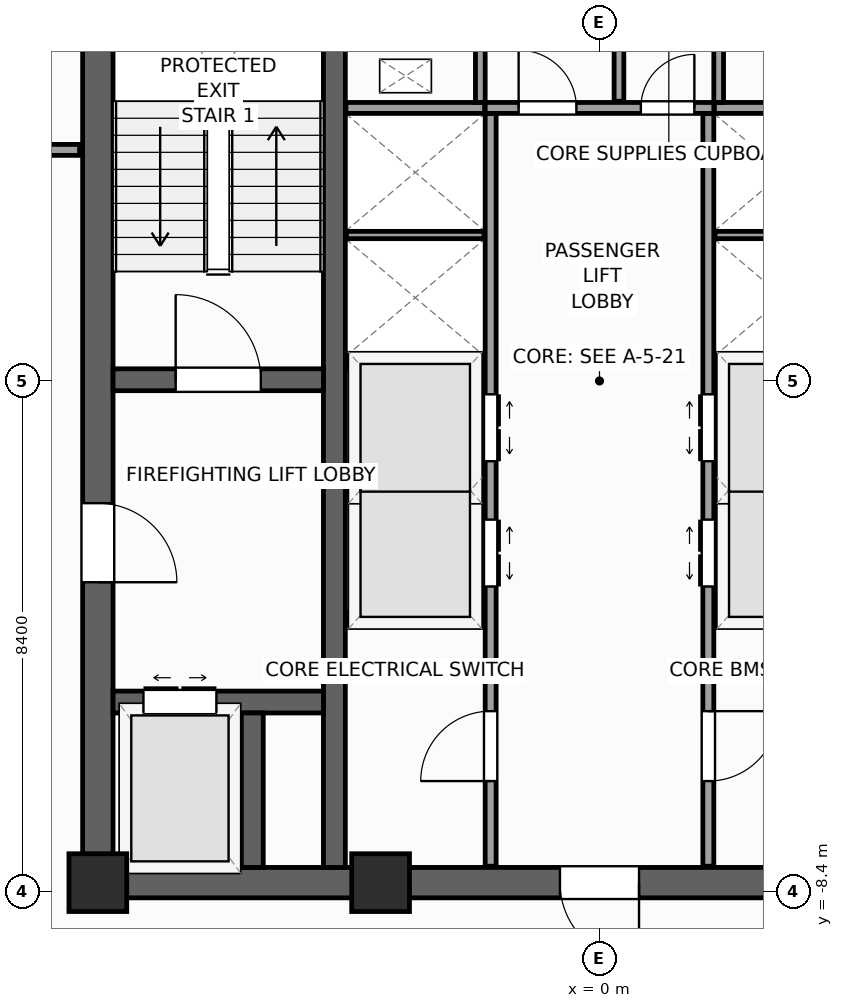
"""IFC4 building model, lengths in metres.
Left out: names, types, materials, properties, quantities, classifications, styles, units other than length and angle.
Written with IfcOpenShell. Run it as: python <this file> out.ifc"""

import sys

from ifc_helpers import new_model, si_unit, direction, frame, frame_2d, origin, origin_2d, place, context, subcontext, project, spatial, rectangle, extrude, source, transform, mapped, element, fill, save


model = new_model("IFC4")
c1 = context("Model", 3, precision=1e-05, world=origin(), true_north=direction((0.0, 1.0)))
c2 = subcontext(c1, "Body", "Model", "MODEL_VIEW")
j1 = project(units=[si_unit("LENGTHUNIT", "METRE"), si_unit("PLANEANGLEUNIT", "RADIAN")], contexts=[c1])
p1 = place(None, origin())
s1 = spatial("IfcSite", under=j1, at=p1, CompositionType="ELEMENT")
p2 = place(p1, origin())
s2 = spatial("IfcBuilding", under=s1, at=p2, CompositionType="ELEMENT")
p3 = place(p2, frame((0.0, 0.0, 225.1)))
s3 = spatial("IfcBuildingStorey", under=s2, at=p3, CompositionType="ELEMENT", Elevation=225.1)
p4 = place(p3, frame((-8.5, -8.25, 0.0), z_axis=(0.0, 0.0, 1.0), x_axis=(1.0, 0.0, 0.0)))
e1 = element("IfcWall", 1, at=p4, inside=s3, PredefinedType="SHEAR", context=c2, shape_type="SweptSolid", body=[
    extrude(rectangle(XDim=17.0, YDim=0.5, at=frame_2d((8.5, 0.0))), origin(), (0.0, 0.0, 1.0), 3.9),
])
p5 = place(p4, frame((7.85, 0.0, 0.0)))
e2 = element("IfcOpeningElement", 2, at=p5, cuts=e1, PredefinedType="OPENING", context=c2, shape_type="SweptSolid", body=[
    extrude(rectangle(XDim=1.3, YDim=2.2, at=frame_2d((0.65, 1.1))), frame((0.0, 0.26, 0.0), z_axis=(0.0, -1.0, 0.0), x_axis=(1.0, 0.0, 0.0)), (0.0, 0.0, 1.0), 0.52),
])
p6 = place(p3, frame((-8.25, -8.0, 0.0), z_axis=(0.0, 0.0, 1.0), x_axis=(0.0, 1.0, 0.0)))
e3 = element("IfcWall", 3, at=p6, inside=s3, PredefinedType="SHEAR", context=c2, shape_type="SweptSolid", body=[
    extrude(rectangle(XDim=16.0, YDim=0.5, at=frame_2d((8.0, 0.0))), origin(), (0.0, 0.0, 1.0), 3.9),
])
p7 = place(p6, frame((4.69, 0.0, 0.0)))
e4 = element("IfcOpeningElement", 4, at=p7, cuts=e3, PredefinedType="OPENING", context=c2, shape_type="SweptSolid", body=[
    extrude(rectangle(XDim=1.3, YDim=2.2, at=frame_2d((0.65, 1.1))), frame((0.0, 0.26, 0.0), z_axis=(0.0, -1.0, 0.0), x_axis=(1.0, 0.0, 0.0)), (0.0, 0.0, 1.0), 0.52),
])
p8 = place(p3, frame((-4.36, -8.0, 0.0), z_axis=(0.0, 0.0, 1.0), x_axis=(0.0, 1.0, 0.0)))
e5 = element("IfcWall", 5, at=p8, inside=s3, PredefinedType="SHEAR", context=c2, shape_type="SweptSolid", body=[
    extrude(rectangle(XDim=16.0, YDim=0.36, at=frame_2d((8.0, 0.0))), origin(), (0.0, 0.0, 1.0), 3.9),
])
p9 = place(p3, frame((-8.0, 0.02, 0.0), z_axis=(0.0, 0.0, 1.0), x_axis=(1.0, 0.0, 0.0)))
e6 = element("IfcWall", 6, at=p9, inside=s3, PredefinedType="SHEAR", context=c2, shape_type="SweptSolid", body=[
    extrude(rectangle(XDim=3.46, YDim=0.36, at=frame_2d((1.73, 0.0))), origin(), (0.0, 0.0, 1.0), 3.9),
])
p10 = place(p9, frame((1.03, 0.0, 0.0)))
e7 = element("IfcOpeningElement", 7, at=p10, cuts=e6, PredefinedType="OPENING", context=c2, shape_type="SweptSolid", body=[
    extrude(rectangle(XDim=1.4, YDim=2.2, at=frame_2d((0.7, 1.1))), frame((0.0, 0.19, 0.0), z_axis=(0.0, -1.0, 0.0), x_axis=(1.0, 0.0, 0.0)), (0.0, 0.0, 1.0), 0.38),
])
p11 = place(p3, frame((-8.0, -5.28, 0.0), z_axis=(0.0, 0.0, 1.0), x_axis=(1.0, 0.0, 0.0)))
e8 = element("IfcWall", 8, at=p11, inside=s3, PredefinedType="SHEAR", context=c2, shape_type="SweptSolid", body=[
    extrude(rectangle(XDim=3.46, YDim=0.36, at=frame_2d((1.73, 0.0))), origin(), (0.0, 0.0, 1.0), 3.9),
])
p12 = place(p11, frame((0.5, 0.0, 0.0)))
e9 = element("IfcOpeningElement", 9, at=p12, cuts=e8, PredefinedType="OPENING", context=c2, shape_type="SweptSolid", body=[
    extrude(rectangle(XDim=1.2, YDim=2.25, at=frame_2d((0.6, 1.125))), frame((0.0, 0.19, 0.0), z_axis=(0.0, -1.0, 0.0), x_axis=(1.0, 0.0, 0.0)), (0.0, 0.0, 1.0), 0.38),
])
p13 = place(p3, frame((-5.71, -8.0, 0.0), z_axis=(0.0, 0.0, 1.0), x_axis=(0.0, 1.0, 0.0)))
e10 = element("IfcWall", 10, at=p13, inside=s3, PredefinedType="SHEAR", context=c2, shape_type="SweptSolid", body=[
    extrude(rectangle(XDim=2.54, YDim=0.36, at=frame_2d((1.27, 0.0))), origin(), (0.0, 0.0, 1.0), 3.9),
])
m1 = source(origin(), c2, "Body", "SweptSolid", [
    extrude(rectangle(XDim=0.95, YDim=0.95, at=origin_2d()), origin(), (0.0, 0.0, 1.0), 3.9),
])
for number, where, z_axis, x_axis in (
    (11, (-8.25, -8.25, 0.0), (0.0, 0.0, 1.0), (1.0, 0.0, 0.0)),
    (12, (-3.6, -8.25, 0.0), (0.0, 0.0, 1.0), (1.0, 0.0, 0.0)),
):
    element("IfcColumn", number, at=place(p3, frame(where, z_axis=z_axis, x_axis=x_axis)), inside=s3, PredefinedType="PILASTER", context=c2, shape_type="MappedRepresentation", body=[
        mapped(m1, transform((0.0, 0.0, 0.0), scale=1.0)),
    ])
p14 = place(p3, frame((-6.733, 29.154, 0.0), z_axis=(0.0, 0.0, 1.0), x_axis=(-0.629325378072, -0.77714192302, 0.0)))
e13 = element("IfcWall", 13, at=p14, inside=s3, PredefinedType="STANDARD", context=c2, shape_type="SweptSolid", body=[
    extrude(rectangle(XDim=36.84, YDim=0.34, at=frame_2d((18.42, 0.0))), origin(), (0.0, 0.0, 1.0), 2.96),
])
p15 = place(p14, frame((12.295, 0.0, 0.0)))
e14 = element("IfcOpeningElement", 14, at=p15, cuts=e13, PredefinedType="OPENING", context=c2, shape_type="SweptSolid", body=[
    extrude(rectangle(XDim=1.05, YDim=2.25, at=frame_2d((0.525, 1.125))), frame((0.0, 0.18, 0.0), z_axis=(0.0, -1.0, 0.0), x_axis=(1.0, 0.0, 0.0)), (0.0, 0.0, 1.0), 0.36),
])
p16 = place(p14, frame((3.721, 0.0, 0.48)))
e15 = element("IfcOpeningElement", 15, at=p16, cuts=e13, PredefinedType="OPENING", context=c2, shape_type="SweptSolid", body=[
    extrude(rectangle(XDim=1.4, YDim=2.4, at=frame_2d((0.7, 1.2))), frame((0.0, 0.18, 0.0), z_axis=(0.0, -1.0, 0.0), x_axis=(1.0, 0.0, 0.0)), (0.0, 0.0, 1.0), 0.36),
])
p17 = place(p14, frame((9.059, 0.0, 0.58)))
e16 = element("IfcOpeningElement", 16, at=p17, cuts=e13, PredefinedType="OPENING", context=c2, shape_type="SweptSolid", body=[
    extrude(rectangle(XDim=1.75, YDim=2.3, at=frame_2d((0.875, 1.15))), frame((0.0, 0.18, 0.0), z_axis=(0.0, -1.0, 0.0), x_axis=(1.0, 0.0, 0.0)), (0.0, 0.0, 1.0), 0.36),
])
p18 = place(p14, frame((16.058, 0.0, 0.58)))
e17 = element("IfcOpeningElement", 17, at=p18, cuts=e13, PredefinedType="OPENING", context=c2, shape_type="SweptSolid", body=[
    extrude(rectangle(XDim=1.75, YDim=2.3, at=frame_2d((0.875, 1.15))), frame((0.0, 0.18, 0.0), z_axis=(0.0, -1.0, 0.0), x_axis=(1.0, 0.0, 0.0)), (0.0, 0.0, 1.0), 0.36),
])
p19 = place(p14, frame((24.176, 0.0, 0.58)))
e18 = element("IfcOpeningElement", 18, at=p19, cuts=e13, PredefinedType="OPENING", context=c2, shape_type="SweptSolid", body=[
    extrude(rectangle(XDim=1.75, YDim=2.3, at=frame_2d((0.875, 1.15))), frame((0.0, 0.18, 0.0), z_axis=(0.0, -1.0, 0.0), x_axis=(1.0, 0.0, 0.0)), (0.0, 0.0, 1.0), 0.36),
])
p20 = place(p14, frame((30.232, 0.0, 0.48)))
e19 = element("IfcOpeningElement", 19, at=p20, cuts=e13, PredefinedType="OPENING", context=c2, shape_type="SweptSolid", body=[
    extrude(rectangle(XDim=1.4, YDim=2.4, at=frame_2d((0.7, 1.2))), frame((0.0, 0.18, 0.0), z_axis=(0.0, -1.0, 0.0), x_axis=(1.0, 0.0, 0.0)), (0.0, 0.0, 1.0), 0.36),
])
p21 = place(p3, frame((-29.154, -6.733, 0.0), z_axis=(0.0, 0.0, 1.0), x_axis=(0.77714192302, -0.629325378072, 0.0)))
e20 = element("IfcWall", 20, at=p21, inside=s3, PredefinedType="STANDARD", context=c2, shape_type="SweptSolid", body=[
    extrude(rectangle(XDim=36.84, YDim=0.34, at=frame_2d((18.42, 0.0))), origin(), (0.0, 0.0, 1.0), 2.96),
])
p22 = place(p21, frame((3.721, 0.0, 0.48)))
e21 = element("IfcOpeningElement", 21, at=p22, cuts=e20, PredefinedType="OPENING", context=c2, shape_type="SweptSolid", body=[
    extrude(rectangle(XDim=1.4, YDim=2.4, at=frame_2d((0.7, 1.2))), frame((0.0, 0.18, 0.0), z_axis=(0.0, -1.0, 0.0), x_axis=(1.0, 0.0, 0.0)), (0.0, 0.0, 1.0), 0.36),
])
p23 = place(p21, frame((9.809, 0.0, 0.58)))
e22 = element("IfcOpeningElement", 22, at=p23, cuts=e20, PredefinedType="OPENING", context=c2, shape_type="SweptSolid", body=[
    extrude(rectangle(XDim=1.75, YDim=2.3, at=frame_2d((0.875, 1.15))), frame((0.0, 0.18, 0.0), z_axis=(0.0, -1.0, 0.0), x_axis=(1.0, 0.0, 0.0)), (0.0, 0.0, 1.0), 0.36),
])
p24 = place(p21, frame((16.058, 0.0, 0.58)))
e23 = element("IfcOpeningElement", 23, at=p24, cuts=e20, PredefinedType="OPENING", context=c2, shape_type="SweptSolid", body=[
    extrude(rectangle(XDim=1.75, YDim=2.3, at=frame_2d((0.875, 1.15))), frame((0.0, 0.18, 0.0), z_axis=(0.0, -1.0, 0.0), x_axis=(1.0, 0.0, 0.0)), (0.0, 0.0, 1.0), 0.36),
])
p25 = place(p21, frame((24.176, 0.0, 0.58)))
e24 = element("IfcOpeningElement", 24, at=p25, cuts=e20, PredefinedType="OPENING", context=c2, shape_type="SweptSolid", body=[
    extrude(rectangle(XDim=1.75, YDim=2.3, at=frame_2d((0.875, 1.15))), frame((0.0, 0.18, 0.0), z_axis=(0.0, -1.0, 0.0), x_axis=(1.0, 0.0, 0.0)), (0.0, 0.0, 1.0), 0.36),
])
p26 = place(p21, frame((30.982, 0.0, 0.48)))
e25 = element("IfcOpeningElement", 25, at=p26, cuts=e20, PredefinedType="OPENING", context=c2, shape_type="SweptSolid", body=[
    extrude(rectangle(XDim=1.4, YDim=2.4, at=frame_2d((0.7, 1.2))), frame((0.0, 0.18, 0.0), z_axis=(0.0, -1.0, 0.0), x_axis=(1.0, 0.0, 0.0)), (0.0, 0.0, 1.0), 0.36),
])
p27 = place(p3, frame((-1.79, -7.98, 0.0), z_axis=(0.0, 0.0, 1.0), x_axis=(0.0, 1.0, 0.0)))
e26 = element("IfcWall", 26, at=p27, inside=s3, PredefinedType="PARTITIONING", context=c2, shape_type="SweptSolid", body=[
    extrude(rectangle(XDim=12.38, YDim=0.18, at=frame_2d((6.19, 0.0))), origin(), (0.0, 0.0, 1.0), 3.66),
])
p28 = place(p27, frame((4.6, 0.0, 0.0)))
e27 = element("IfcOpeningElement", 27, at=p28, cuts=e26, PredefinedType="OPENING", context=c2, shape_type="SweptSolid", body=[
    extrude(rectangle(XDim=1.1, YDim=2.2, at=frame_2d((0.55, 1.1))), frame((0.0, 0.1, 0.0), z_axis=(0.0, -1.0, 0.0), x_axis=(1.0, 0.0, 0.0)), (0.0, 0.0, 1.0), 0.2),
])
p29 = place(p27, frame((6.66, 0.0, 0.0)))
e28 = element("IfcOpeningElement", 28, at=p29, cuts=e26, PredefinedType="OPENING", context=c2, shape_type="SweptSolid", body=[
    extrude(rectangle(XDim=1.1, YDim=2.2, at=frame_2d((0.55, 1.1))), frame((0.0, 0.1, 0.0), z_axis=(0.0, -1.0, 0.0), x_axis=(1.0, 0.0, 0.0)), (0.0, 0.0, 1.0), 0.2),
])
p30 = place(p27, frame((1.4, 0.0, 0.0)))
e29 = element("IfcOpeningElement", 29, at=p30, cuts=e26, PredefinedType="OPENING", context=c2, shape_type="SweptSolid", body=[
    extrude(rectangle(XDim=1.15, YDim=2.25, at=frame_2d((0.575, 1.125))), frame((0.0, 0.1, 0.0), z_axis=(0.0, -1.0, 0.0), x_axis=(1.0, 0.0, 0.0)), (0.0, 0.0, 1.0), 0.2),
])
p31 = place(p3, frame((1.79, -7.98, 0.0), z_axis=(0.0, 0.0, 1.0), x_axis=(0.0, 1.0, 0.0)))
e30 = element("IfcWall", 30, at=p31, inside=s3, PredefinedType="PARTITIONING", context=c2, shape_type="SweptSolid", body=[
    extrude(rectangle(XDim=12.38, YDim=0.18, at=frame_2d((6.19, 0.0))), origin(), (0.0, 0.0, 1.0), 3.66),
])
p32 = place(p31, frame((4.6, 0.0, 0.0)))
e31 = element("IfcOpeningElement", 31, at=p32, cuts=e30, PredefinedType="OPENING", context=c2, shape_type="SweptSolid", body=[
    extrude(rectangle(XDim=1.1, YDim=2.2, at=frame_2d((0.55, 1.1))), frame((0.0, 0.1, 0.0), z_axis=(0.0, -1.0, 0.0), x_axis=(1.0, 0.0, 0.0)), (0.0, 0.0, 1.0), 0.2),
])
p33 = place(p31, frame((6.66, 0.0, 0.0)))
e32 = element("IfcOpeningElement", 32, at=p33, cuts=e30, PredefinedType="OPENING", context=c2, shape_type="SweptSolid", body=[
    extrude(rectangle(XDim=1.1, YDim=2.2, at=frame_2d((0.55, 1.1))), frame((0.0, 0.1, 0.0), z_axis=(0.0, -1.0, 0.0), x_axis=(1.0, 0.0, 0.0)), (0.0, 0.0, 1.0), 0.2),
])
p34 = place(p31, frame((1.4, 0.0, 0.0)))
e33 = element("IfcOpeningElement", 33, at=p34, cuts=e30, PredefinedType="OPENING", context=c2, shape_type="SweptSolid", body=[
    extrude(rectangle(XDim=1.15, YDim=2.25, at=frame_2d((0.575, 1.125))), frame((0.0, 0.1, 0.0), z_axis=(0.0, -1.0, 0.0), x_axis=(1.0, 0.0, 0.0)), (0.0, 0.0, 1.0), 0.2),
])
p35 = place(p3, frame((-1.88, 4.49, 0.0), z_axis=(0.0, 0.0, 1.0), x_axis=(1.0, 0.0, 0.0)))
e34 = element("IfcWall", 34, at=p35, inside=s3, PredefinedType="PARTITIONING", context=c2, shape_type="SweptSolid", body=[
    extrude(rectangle(XDim=3.76, YDim=0.18, at=frame_2d((1.88, 0.0))), origin(), (0.0, 0.0, 1.0), 3.66),
])
p36 = place(p35, frame((0.55, 0.0, 0.0)))
e35 = element("IfcOpeningElement", 35, at=p36, cuts=e34, PredefinedType="OPENING", context=c2, shape_type="SweptSolid", body=[
    extrude(rectangle(XDim=0.95, YDim=2.1, at=frame_2d((0.475, 1.05))), frame((0.0, 0.1, 0.0), z_axis=(0.0, -1.0, 0.0), x_axis=(1.0, 0.0, 0.0)), (0.0, 0.0, 1.0), 0.2),
])
p37 = place(p35, frame((2.56, 0.0, 0.0)))
e36 = element("IfcOpeningElement", 36, at=p37, cuts=e34, PredefinedType="OPENING", context=c2, shape_type="SweptSolid", body=[
    extrude(rectangle(XDim=0.88, YDim=2.1, at=frame_2d((0.44, 1.05))), frame((0.0, 0.1, 0.0), z_axis=(0.0, -1.0, 0.0), x_axis=(1.0, 0.0, 0.0)), (0.0, 0.0, 1.0), 0.2),
])
for number, where, z_axis, x_axis in (
    (37, (-4.17, -3.9, 0.0), (0.0, 0.0, 1.0), (1.0, 0.0, 0.0)),
    (38, (1.89, -3.9, 0.0), (0.0, 0.0, 1.0), (1.0, 0.0, 0.0)),
    (39, (-4.17, 0.3, 0.0), (0.0, 0.0, 1.0), (1.0, 0.0, 0.0)),
    (40, (1.89, 0.3, 0.0), (0.0, 0.0, 1.0), (1.0, 0.0, 0.0)),
    (41, (-4.17, 4.49, 0.0), (0.0, 0.0, 1.0), (1.0, 0.0, 0.0)),
    (42, (1.89, 4.49, 0.0), (0.0, 0.0, 1.0), (1.0, 0.0, 0.0)),
):
    element("IfcWall", number, at=place(p3, frame(where, z_axis=z_axis, x_axis=x_axis)), inside=s3, PredefinedType="PARTITIONING", context=c2, shape_type="SweptSolid", body=[
        extrude(rectangle(XDim=2.28, YDim=0.18, at=frame_2d((1.14, 0.0))), origin(), (0.0, 0.0, 1.0), 3.66),
    ])
for number, where, z_axis, x_axis in (
    (43, (-4.16, -1.8, 0.0), (0.0, 0.0, 1.0), (1.0, 0.0, 0.0)),
    (44, (1.9, -1.8, 0.0), (0.0, 0.0, 1.0), (1.0, 0.0, 0.0)),
    (45, (-4.16, 2.4, 0.0), (0.0, 0.0, 1.0), (1.0, 0.0, 0.0)),
    (46, (1.9, 2.4, 0.0), (0.0, 0.0, 1.0), (1.0, 0.0, 0.0)),
):
    element("IfcWall", number, at=place(p3, frame(where, z_axis=z_axis, x_axis=x_axis)), inside=s3, PredefinedType="PARTITIONING", context=c2, shape_type="SweptSolid", body=[
        extrude(rectangle(XDim=2.26, YDim=0.12, at=frame_2d((1.13, 0.0))), origin(), (0.0, 0.0, 1.0), 3.66),
    ])
for number, where, z_axis, x_axis in (
    (47, (-1.96, 4.58, 0.0), (0.0, 0.0, 1.0), (0.0, 1.0, 0.0)),
    (48, (1.96, 4.58, 0.0), (0.0, 0.0, 1.0), (0.0, 1.0, 0.0)),
):
    element("IfcWall", number, at=place(p3, frame(where, z_axis=z_axis, x_axis=x_axis)), inside=s3, PredefinedType="PARTITIONING", context=c2, shape_type="SweptSolid", body=[
        extrude(rectangle(XDim=3.4, YDim=0.16, at=frame_2d((1.7, 0.0))), origin(), (0.0, 0.0, 1.0), 3.66),
    ])
p38 = place(p3, frame((0.32, 4.6, 0.0), z_axis=(0.0, 0.0, 1.0), x_axis=(0.0, 1.0, 0.0)))
e49 = element("IfcWall", 49, at=p38, inside=s3, PredefinedType="PARTITIONING", context=c2, shape_type="SweptSolid", body=[
    extrude(rectangle(XDim=1.95, YDim=0.16, at=frame_2d((0.975, 0.0))), origin(), (0.0, 0.0, 1.0), 3.66),
])
p39 = place(p3, frame((-12.45, 3.8, 0.0), z_axis=(0.0, 0.0, 1.0), x_axis=(1.0, 0.0, 0.0)))
e50 = element("IfcWall", 50, at=p39, inside=s3, PredefinedType="PARTITIONING", context=c2, shape_type="SweptSolid", body=[
    extrude(rectangle(XDim=3.9, YDim=0.18, at=frame_2d((1.95, 0.0))), origin(), (0.0, 0.0, 1.0), 3.66),
])
p40 = place(p39, frame((1.4, 0.0, 0.0)))
e51 = element("IfcOpeningElement", 51, at=p40, cuts=e50, PredefinedType="OPENING", context=c2, shape_type="SweptSolid", body=[
    extrude(rectangle(XDim=1.1, YDim=2.2, at=frame_2d((0.55, 1.1))), frame((0.0, 0.1, 0.0), z_axis=(0.0, -1.0, 0.0), x_axis=(1.0, 0.0, 0.0)), (0.0, 0.0, 1.0), 0.2),
])
m2 = source(origin(), c2, "Body", "SweptSolid", [
    extrude(rectangle(XDim=1.4, YDim=2.2, at=frame_2d((0.7, 1.1))), frame((0.0, 0.025, 0.0), z_axis=(0.0, -1.0, 0.0), x_axis=(1.0, 0.0, 0.0)), (0.0, 0.0, 1.0), 0.05),
])
p41 = place(p10, origin())
e52 = element("IfcDoor", 52, at=p41, inside=s3, OperationType="SINGLE_SWING_LEFT", PredefinedType="DOOR", context=c2, shape_type="MappedRepresentation", body=[
    mapped(m2, transform((0.0, 0.0, 0.0), scale=1.0)),
])
fill(e7, e52)
m3 = source(origin(), c2, "Body", "SweptSolid", [
    extrude(rectangle(XDim=1.3, YDim=2.2, at=frame_2d((0.65, 1.1))), frame((0.0, 0.025, 0.0), z_axis=(0.0, -1.0, 0.0), x_axis=(1.0, 0.0, 0.0)), (0.0, 0.0, 1.0), 0.05),
])
p42 = place(p7, frame((1.3, 0.0, 0.0), z_axis=(0.0, 0.0, 1.0), x_axis=(-1.0, 0.0, 0.0)))
e53 = element("IfcDoor", 53, at=p42, inside=s3, OperationType="SINGLE_SWING_LEFT", PredefinedType="DOOR", context=c2, shape_type="MappedRepresentation", body=[
    mapped(m3, transform((0.0, 0.0, 0.0), scale=1.0)),
])
fill(e4, e53)
p43 = place(p5, frame((1.3, 0.0, 0.0), z_axis=(0.0, 0.0, 1.0), x_axis=(-1.0, 0.0, 0.0)))
e54 = element("IfcDoor", 54, at=p43, inside=s3, OperationType="SINGLE_SWING_RIGHT", PredefinedType="DOOR", context=c2, shape_type="MappedRepresentation", body=[
    mapped(m3, transform((0.0, 0.0, 0.0), scale=1.0)),
])
fill(e2, e54)
m4 = source(origin(), c2, "Body", "SweptSolid", [
    extrude(rectangle(XDim=1.2, YDim=2.25, at=frame_2d((0.6, 1.125))), frame((0.0, 0.025, 0.0), z_axis=(0.0, -1.0, 0.0), x_axis=(1.0, 0.0, 0.0)), (0.0, 0.0, 1.0), 0.05),
])
p44 = place(p12, origin())
e55 = element("IfcDoor", 55, at=p44, inside=s3, OperationType="DOUBLE_DOOR_SLIDING", PredefinedType="DOOR", context=c2, shape_type="MappedRepresentation", body=[
    mapped(m4, transform((0.0, 0.0, 0.0), scale=1.0)),
])
fill(e9, e55)
m5 = source(origin(), c2, "Body", "SweptSolid", [
    extrude(rectangle(XDim=1.1, YDim=2.2, at=frame_2d((0.55, 1.1))), frame((0.0, 0.025, 0.0), z_axis=(0.0, -1.0, 0.0), x_axis=(1.0, 0.0, 0.0)), (0.0, 0.0, 1.0), 0.05),
])
p45 = place(p28, frame((1.1, 0.0, 0.0), z_axis=(0.0, 0.0, 1.0), x_axis=(-1.0, 0.0, 0.0)))
e56 = element("IfcDoor", 56, at=p45, inside=s3, OperationType="DOUBLE_DOOR_SLIDING", PredefinedType="DOOR", context=c2, shape_type="MappedRepresentation", body=[
    mapped(m5, transform((0.0, 0.0, 0.0), scale=1.0)),
])
fill(e27, e56)
p46 = place(p29, frame((1.1, 0.0, 0.0), z_axis=(0.0, 0.0, 1.0), x_axis=(-1.0, 0.0, 0.0)))
e57 = element("IfcDoor", 57, at=p46, inside=s3, OperationType="DOUBLE_DOOR_SLIDING", PredefinedType="DOOR", context=c2, shape_type="MappedRepresentation", body=[
    mapped(m5, transform((0.0, 0.0, 0.0), scale=1.0)),
])
fill(e28, e57)
p47 = place(p32, origin())
e58 = element("IfcDoor", 58, at=p47, inside=s3, OperationType="DOUBLE_DOOR_SLIDING", PredefinedType="DOOR", context=c2, shape_type="MappedRepresentation", body=[
    mapped(m5, transform((0.0, 0.0, 0.0), scale=1.0)),
])
fill(e31, e58)
p48 = place(p33, origin())
e59 = element("IfcDoor", 59, at=p48, inside=s3, OperationType="DOUBLE_DOOR_SLIDING", PredefinedType="DOOR", context=c2, shape_type="MappedRepresentation", body=[
    mapped(m5, transform((0.0, 0.0, 0.0), scale=1.0)),
])
fill(e32, e59)
m6 = source(origin(), c2, "Body", "SweptSolid", [
    extrude(rectangle(XDim=1.15, YDim=2.25, at=frame_2d((0.575, 1.125))), frame((0.0, 0.025, 0.0), z_axis=(0.0, -1.0, 0.0), x_axis=(1.0, 0.0, 0.0)), (0.0, 0.0, 1.0), 0.05),
])
p49 = place(p30, origin())
e60 = element("IfcDoor", 60, at=p49, inside=s3, OperationType="SINGLE_SWING_LEFT", PredefinedType="DOOR", context=c2, shape_type="MappedRepresentation", body=[
    mapped(m6, transform((0.0, 0.0, 0.0), scale=1.0)),
])
fill(e29, e60)
p50 = place(p34, frame((1.15, 0.0, 0.0), z_axis=(0.0, 0.0, 1.0), x_axis=(-1.0, 0.0, 0.0)))
e61 = element("IfcDoor", 61, at=p50, inside=s3, OperationType="SINGLE_SWING_RIGHT", PredefinedType="DOOR", context=c2, shape_type="MappedRepresentation", body=[
    mapped(m6, transform((0.0, 0.0, 0.0), scale=1.0)),
])
fill(e33, e61)
m7 = source(origin(), c2, "Body", "SweptSolid", [
    extrude(rectangle(XDim=0.95, YDim=2.1, at=frame_2d((0.475, 1.05))), frame((0.0, 0.025, 0.0), z_axis=(0.0, -1.0, 0.0), x_axis=(1.0, 0.0, 0.0)), (0.0, 0.0, 1.0), 0.05),
])
p51 = place(p36, origin())
e62 = element("IfcDoor", 62, at=p51, inside=s3, OperationType="SINGLE_SWING_LEFT", PredefinedType="DOOR", context=c2, shape_type="MappedRepresentation", body=[
    mapped(m7, transform((0.0, 0.0, 0.0), scale=1.0)),
])
fill(e35, e62)
m8 = source(origin(), c2, "Body", "SweptSolid", [
    extrude(rectangle(XDim=0.88, YDim=2.1, at=frame_2d((0.44, 1.05))), frame((0.0, 0.025, 0.0), z_axis=(0.0, -1.0, 0.0), x_axis=(1.0, 0.0, 0.0)), (0.0, 0.0, 1.0), 0.05),
])
p52 = place(p37, origin())
e63 = element("IfcDoor", 63, at=p52, inside=s3, OperationType="SINGLE_SWING_RIGHT", PredefinedType="DOOR", context=c2, shape_type="MappedRepresentation", body=[
    mapped(m8, transform((0.0, 0.0, 0.0), scale=1.0)),
])
fill(e36, e63)
save(model, sys.argv[1])
